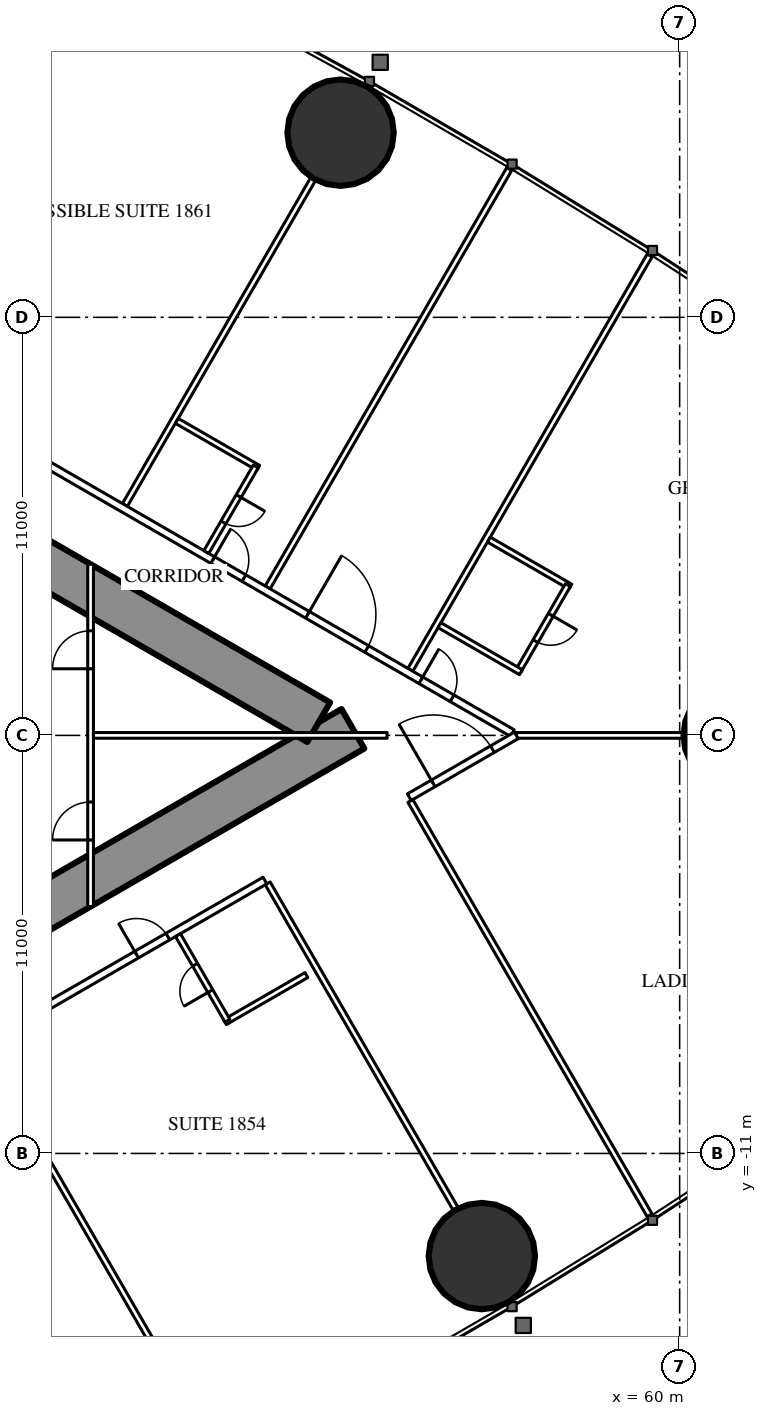
"""IFC4 building model, lengths in metres.
Left out: names, types, materials, properties, quantities, classifications, styles, units other than length and angle.
Written with IfcOpenShell. Run it as: python <this file> out.ifc"""

import sys

from ifc_helpers import new_model, si_unit, direction, frame, frame_2d, origin, origin_2d, place, context, subcontext, project, spatial, rectangle, hollow_circle, extrude, element, fill, save


model = new_model("IFC4")
c1 = context("Model", 3, precision=1e-05, world=origin(), true_north=direction((0.0, 1.0)))
c2 = subcontext(c1, "Body", "Model", "MODEL_VIEW")
j1 = project(units=[si_unit("LENGTHUNIT", "METRE"), si_unit("PLANEANGLEUNIT", "RADIAN")], contexts=[c1])
p1 = place(None, origin())
s1 = spatial("IfcSite", under=j1, at=p1, CompositionType="ELEMENT")
p2 = place(p1, origin())
s2 = spatial("IfcBuilding", under=s1, at=p2, CompositionType="ELEMENT")
p3 = place(p2, frame((0.0, 0.0, 70.5)))
s3 = spatial("IfcBuildingStorey", under=s2, at=p3, CompositionType="ELEMENT", Elevation=70.5)
for number, where, z_axis, x_axis in (
    (1, (51.078, 15.858, 0.0), (0.0, 0.0, 1.0), (1.0, 0.0, 0.0)),
    (2, (54.795, -13.701, 0.0), (0.0, 0.0, 1.0), (1.0, 0.0, 0.0)),
):
    element("IfcColumn", number, at=place(p3, frame(where, z_axis=z_axis, x_axis=x_axis)), inside=s3, PredefinedType="COLUMN", context=c2, shape_type="SweptSolid", body=[
        extrude(hollow_circle(Radius=1.4, WallThickness=0.12, at=origin_2d()), origin(), (0.0, 0.0, 1.0), 3.5),
    ])
p4 = place(p3, frame((61.5, 0.0, 0.0), z_axis=(0.0, 0.0, 1.0), x_axis=(1.0, 0.0, 0.0)))
e3 = element("IfcColumn", 3, at=p4, inside=s3, PredefinedType="COLUMN", context=c2, shape_type="SweptSolid", body=[
    extrude(hollow_circle(Radius=1.4, WallThickness=0.1, at=origin_2d()), origin(), (0.0, 0.0, 1.0), 3.5),
])
p5 = place(p3, frame((27.2, -13.8, 0.0), z_axis=(0.0, 0.0, 1.0), x_axis=(0.866027159892, 0.499996958321, 0.0)))
e4 = element("IfcWall", 4, at=p5, inside=s3, PredefinedType="SHEAR", context=c2, shape_type="SweptSolid", body=[
    extrude(rectangle(XDim=27.947, YDim=1.2, at=frame_2d((13.973, 0.0))), origin(), (0.0, 0.0, 1.0), 3.5),
])
p6 = place(p5, frame((4.6, 0.0, 0.0)))
e5 = element("IfcOpeningElement", 5, at=p6, cuts=e4, PredefinedType="OPENING", context=c2, shape_type="SweptSolid", body=[
    extrude(rectangle(XDim=1.0, YDim=2.2, at=frame_2d((0.5, 1.1))), frame((0.0, 0.61, 0.0), z_axis=(0.0, -1.0, 0.0), x_axis=(1.0, 0.0, 0.0)), (0.0, 0.0, 1.0), 1.22),
])
p7 = place(p5, frame((13.395, 0.0, 0.0)))
e6 = element("IfcOpeningElement", 6, at=p7, cuts=e4, PredefinedType="OPENING", context=c2, shape_type="SweptSolid", body=[
    extrude(rectangle(XDim=1.8, YDim=2.2, at=frame_2d((0.9, 1.1))), frame((0.0, 0.61, 0.0), z_axis=(0.0, -1.0, 0.0), x_axis=(1.0, 0.0, 0.0)), (0.0, 0.0, 1.0), 1.22),
])
p8 = place(p3, frame((27.2, 13.8, 0.0), z_axis=(0.0, 0.0, 1.0), x_axis=(0.866024515034, -0.500001539357, 0.0)))
e7 = element("IfcWall", 7, at=p8, inside=s3, PredefinedType="SHEAR", context=c2, shape_type="SweptSolid", body=[
    extrude(rectangle(XDim=26.907, YDim=1.2, at=frame_2d((13.454, 0.0))), origin(), (0.0, 0.0, 1.0), 3.5),
])
p9 = place(p8, frame((4.6, 0.0, 0.0)))
e8 = element("IfcOpeningElement", 8, at=p9, cuts=e7, PredefinedType="OPENING", context=c2, shape_type="SweptSolid", body=[
    extrude(rectangle(XDim=1.0, YDim=2.2, at=frame_2d((0.5, 1.1))), frame((0.0, 0.61, 0.0), z_axis=(0.0, -1.0, 0.0), x_axis=(1.0, 0.0, 0.0)), (0.0, 0.0, 1.0), 1.22),
])
p10 = place(p8, frame((13.395, 0.0, 0.0)))
e9 = element("IfcOpeningElement", 9, at=p10, cuts=e7, PredefinedType="OPENING", context=c2, shape_type="SweptSolid", body=[
    extrude(rectangle(XDim=1.8, YDim=2.2, at=frame_2d((0.9, 1.1))), frame((0.0, 0.61, 0.0), z_axis=(0.0, -1.0, 0.0), x_axis=(1.0, 0.0, 0.0)), (0.0, 0.0, 1.0), 1.22),
])
p11 = place(p3, frame((41.647, -8.23, 0.0), z_axis=(0.0, 0.0, 1.0), x_axis=(0.49998590462, -0.866033541603, 0.0)))
e10 = element("IfcWall", 10, at=p11, inside=s3, PredefinedType="PARTITIONING", context=c2, shape_type="SweptSolid", body=[
    extrude(rectangle(XDim=12.621, YDim=0.15, at=frame_2d((6.311, 0.0))), origin(), (0.0, 0.0, 1.0), 3.25),
])
p12 = place(p3, frame((49.159, -3.893, 0.0), z_axis=(0.0, 0.0, 1.0), x_axis=(0.499998773722, -0.866026111775, 0.0)))
e11 = element("IfcWall", 11, at=p12, inside=s3, PredefinedType="PARTITIONING", context=c2, shape_type="SweptSolid", body=[
    extrude(rectangle(XDim=9.892, YDim=0.15, at=frame_2d((4.946, 0.0))), origin(), (0.0, 0.0, 1.0), 2.25),
])
p13 = place(p3, frame((52.915, -1.725, 0.0), z_axis=(0.0, 0.0, 1.0), x_axis=(0.499997163113, -0.866027041656, 0.0)))
e12 = element("IfcWall", 12, at=p13, inside=s3, PredefinedType="PARTITIONING", context=c2, shape_type="SweptSolid", body=[
    extrude(rectangle(XDim=12.591, YDim=0.15, at=frame_2d((6.295, 0.0))), origin(), (0.0, 0.0, 1.0), 3.25),
])
p14 = place(p3, frame((45.403, 6.062, 0.0), z_axis=(0.0, 0.0, 1.0), x_axis=(0.500013434677, 0.866017647131, 0.0)))
e13 = element("IfcWall", 13, at=p14, inside=s3, PredefinedType="PARTITIONING", context=c2, shape_type="SweptSolid", body=[
    extrude(rectangle(XDim=9.902, YDim=0.15, at=frame_2d((4.951, 0.0))), origin(), (0.0, 0.0, 1.0), 2.25),
])
p15 = place(p3, frame((49.159, 3.893, 0.0), z_axis=(0.0, 0.0, 1.0), x_axis=(0.499995664361, 0.866027906952, 0.0)))
e14 = element("IfcWall", 14, at=p15, inside=s3, PredefinedType="PARTITIONING", context=c2, shape_type="SweptSolid", body=[
    extrude(rectangle(XDim=12.711, YDim=0.15, at=frame_2d((6.356, 0.0))), origin(), (0.0, 0.0, 1.0), 3.25),
])
p16 = place(p3, frame((52.915, 1.725, 0.0), z_axis=(0.0, 0.0, 1.0), x_axis=(0.499997163113, 0.866027041656, 0.0)))
e15 = element("IfcWall", 15, at=p16, inside=s3, PredefinedType="PARTITIONING", context=c2, shape_type="SweptSolid", body=[
    extrude(rectangle(XDim=12.591, YDim=0.15, at=frame_2d((6.295, 0.0))), origin(), (0.0, 0.0, 1.0), 3.25),
])
p17 = place(p3, frame((55.702, 0.0, 0.0), z_axis=(0.0, 0.0, 1.0), x_axis=(1.0, 0.0, 0.0)))
e16 = element("IfcWall", 16, at=p17, inside=s3, PredefinedType="PARTITIONING", context=c2, shape_type="SweptSolid", body=[
    extrude(rectangle(XDim=16.117, YDim=0.15, at=frame_2d((8.059, 0.0))), origin(), (0.0, 0.0, 1.0), 2.25),
])
p18 = place(p3, frame((36.834, 10.894, 0.0), z_axis=(0.0, 0.0, 1.0), x_axis=(0.866028157229, -0.499995230863, 0.0)))
e17 = element("IfcWall", 17, at=p18, inside=s3, PredefinedType="PARTITIONING", context=c2, shape_type="SweptSolid", body=[
    extrude(rectangle(XDim=21.667, YDim=0.2, at=frame_2d((10.833, 0.0))), origin(), (0.0, 0.0, 1.0), 3.25),
])
p19 = place(p18, frame((18.885, 0.0, 0.0)))
e18 = element("IfcOpeningElement", 18, at=p19, cuts=e17, PredefinedType="OPENING", context=c2, shape_type="SweptSolid", body=[
    extrude(rectangle(XDim=0.95, YDim=2.2, at=frame_2d((0.475, 1.1))), frame((0.0, 0.11, 0.0), z_axis=(0.0, -1.0, 0.0), x_axis=(1.0, 0.0, 0.0)), (0.0, 0.0, 1.0), 0.22),
])
p20 = place(p18, frame((15.443, 0.0, 0.0)))
e19 = element("IfcOpeningElement", 19, at=p20, cuts=e17, PredefinedType="OPENING", context=c2, shape_type="SweptSolid", body=[
    extrude(rectangle(XDim=1.8, YDim=2.2, at=frame_2d((0.9, 1.1))), frame((0.0, 0.11, 0.0), z_axis=(0.0, -1.0, 0.0), x_axis=(1.0, 0.0, 0.0)), (0.0, 0.0, 1.0), 0.22),
])
p21 = place(p18, frame((12.562, 0.0, 0.0)))
e20 = element("IfcOpeningElement", 20, at=p21, cuts=e17, PredefinedType="OPENING", context=c2, shape_type="SweptSolid", body=[
    extrude(rectangle(XDim=0.95, YDim=2.2, at=frame_2d((0.475, 1.1))), frame((0.0, 0.11, 0.0), z_axis=(0.0, -1.0, 0.0), x_axis=(1.0, 0.0, 0.0)), (0.0, 0.0, 1.0), 0.22),
])
p22 = place(p18, frame((4.292, 0.0, 0.0)))
e21 = element("IfcOpeningElement", 21, at=p22, cuts=e17, PredefinedType="OPENING", context=c2, shape_type="SweptSolid", body=[
    extrude(rectangle(XDim=1.0, YDim=2.2, at=frame_2d((0.5, 1.1))), frame((0.0, 0.11, 0.0), z_axis=(0.0, -1.0, 0.0), x_axis=(1.0, 0.0, 0.0)), (0.0, 0.0, 1.0), 0.22),
])
p23 = place(p3, frame((37.96, -10.243, 0.0), z_axis=(0.0, 0.0, 1.0), x_axis=(0.866030548046, 0.499991089772, 0.0)))
e22 = element("IfcWall", 22, at=p23, inside=s3, PredefinedType="PARTITIONING", context=c2, shape_type="SweptSolid", body=[
    extrude(rectangle(XDim=12.849, YDim=0.2, at=frame_2d((6.425, 0.0))), origin(), (0.0, 0.0, 1.0), 3.25),
])
p24 = place(p23, frame((8.949, 0.0, 0.0)))
e23 = element("IfcOpeningElement", 23, at=p24, cuts=e22, PredefinedType="OPENING", context=c2, shape_type="SweptSolid", body=[
    extrude(rectangle(XDim=0.95, YDim=2.2, at=frame_2d((0.475, 1.1))), frame((0.0, 0.11, 0.0), z_axis=(0.0, -1.0, 0.0), x_axis=(1.0, 0.0, 0.0)), (0.0, 0.0, 1.0), 0.22),
])
p25 = place(p23, frame((0.6, 0.0, 0.0)))
e24 = element("IfcOpeningElement", 24, at=p25, cuts=e22, PredefinedType="OPENING", context=c2, shape_type="SweptSolid", body=[
    extrude(rectangle(XDim=0.95, YDim=2.2, at=frame_2d((0.475, 1.1))), frame((0.0, 0.11, 0.0), z_axis=(0.0, -1.0, 0.0), x_axis=(1.0, 0.0, 0.0)), (0.0, 0.0, 1.0), 0.22),
])
p26 = place(p3, frame((52.886, -1.626, 0.0), z_axis=(0.0, 0.0, 1.0), x_axis=(0.866030540913, 0.499991102127, 0.0)))
e25 = element("IfcWall", 25, at=p26, inside=s3, PredefinedType="PARTITIONING", context=c2, shape_type="SweptSolid", body=[
    extrude(rectangle(XDim=3.251, YDim=0.2, at=frame_2d((1.626, 0.0))), origin(), (0.0, 0.0, 1.0), 3.25),
])
p27 = place(p26, frame((0.726, 0.0, 0.0)))
e26 = element("IfcOpeningElement", 26, at=p27, cuts=e25, PredefinedType="OPENING", context=c2, shape_type="SweptSolid", body=[
    extrude(rectangle(XDim=1.8, YDim=2.2, at=frame_2d((0.9, 1.1))), frame((0.0, 0.11, 0.0), z_axis=(0.0, -1.0, 0.0), x_axis=(1.0, 0.0, 0.0)), (0.0, 0.0, 1.0), 0.22),
])
p28 = place(p3, frame((48.035, -7.545, 0.0), z_axis=(0.0, 0.0, 1.0), x_axis=(0.866006523861, 0.500032699561, 0.0)))
e27 = element("IfcWall", 27, at=p28, inside=s3, PredefinedType="PARTITIONING", context=c2, shape_type="SweptSolid", body=[
    extrude(rectangle(XDim=2.475, YDim=0.15, at=frame_2d((1.237, 0.0))), origin(), (0.0, 0.0, 1.0), 3.25),
])
p29 = place(p3, frame((46.8, -5.255, 0.0), z_axis=(0.0, 0.0, 1.0), x_axis=(0.500006934395, -0.866021400173, 0.0)))
e28 = element("IfcWall", 28, at=p29, inside=s3, PredefinedType="PARTITIONING", context=c2, shape_type="SweptSolid", body=[
    extrude(rectangle(XDim=2.6, YDim=0.15, at=frame_2d((1.3, 0.0))), origin(), (0.0, 0.0, 1.0), 3.25),
])
p30 = place(p29, frame((0.9, 0.0, 0.0)))
e29 = element("IfcOpeningElement", 29, at=p30, cuts=e28, PredefinedType="OPENING", context=c2, shape_type="SweptSolid", body=[
    extrude(rectangle(XDim=0.8, YDim=2.2, at=frame_2d((0.4, 1.1))), frame((0.0, 0.085, 0.0), z_axis=(0.0, -1.0, 0.0), x_axis=(1.0, 0.0, 0.0)), (0.0, 0.0, 1.0), 0.17),
])
p31 = place(p3, frame((54.98, 5.151, 0.0), z_axis=(0.0, 0.0, 1.0), x_axis=(0.86604923931, -0.499958713387, 0.0)))
e30 = element("IfcWall", 30, at=p31, inside=s3, PredefinedType="PARTITIONING", context=c2, shape_type="SweptSolid", body=[
    extrude(rectangle(XDim=2.475, YDim=0.15, at=frame_2d((1.237, 0.0))), origin(), (0.0, 0.0, 1.0), 3.25),
])
p32 = place(p3, frame((55.758, 1.7, 0.0), z_axis=(0.0, 0.0, 1.0), x_axis=(0.500006934395, 0.866021400173, 0.0)))
e31 = element("IfcWall", 31, at=p32, inside=s3, PredefinedType="PARTITIONING", context=c2, shape_type="SweptSolid", body=[
    extrude(rectangle(XDim=2.6, YDim=0.15, at=frame_2d((1.3, 0.0))), origin(), (0.0, 0.0, 1.0), 3.25),
])
p33 = place(p32, frame((0.9, 0.0, 0.0)))
e32 = element("IfcOpeningElement", 32, at=p33, cuts=e31, PredefinedType="OPENING", context=c2, shape_type="SweptSolid", body=[
    extrude(rectangle(XDim=0.8, YDim=2.2, at=frame_2d((0.4, 1.1))), frame((0.0, 0.085, 0.0), z_axis=(0.0, -1.0, 0.0), x_axis=(1.0, 0.0, 0.0)), (0.0, 0.0, 1.0), 0.17),
])
p34 = place(p3, frame((53.68, 2.9, 0.0), z_axis=(0.0, 0.0, 1.0), x_axis=(0.866006523861, -0.500032699561, 0.0)))
e33 = element("IfcWall", 33, at=p34, inside=s3, PredefinedType="PARTITIONING", context=c2, shape_type="SweptSolid", body=[
    extrude(rectangle(XDim=2.475, YDim=0.15, at=frame_2d((1.237, 0.0))), origin(), (0.0, 0.0, 1.0), 3.25),
])
p35 = place(p3, frame((46.768, 8.276, 0.0), z_axis=(0.0, 0.0, 1.0), x_axis=(0.866031185235, -0.4999899861, 0.0)))
e34 = element("IfcWall", 34, at=p35, inside=s3, PredefinedType="PARTITIONING", context=c2, shape_type="SweptSolid", body=[
    extrude(rectangle(XDim=2.475, YDim=0.15, at=frame_2d((1.238, 0.0))), origin(), (0.0, 0.0, 1.0), 3.25),
])
p36 = place(p3, frame((47.546, 4.824, 0.0), z_axis=(0.0, 0.0, 1.0), x_axis=(0.500006934395, 0.866021400173, 0.0)))
e35 = element("IfcWall", 35, at=p36, inside=s3, PredefinedType="PARTITIONING", context=c2, shape_type="SweptSolid", body=[
    extrude(rectangle(XDim=2.6, YDim=0.15, at=frame_2d((1.3, 0.0))), origin(), (0.0, 0.0, 1.0), 3.25),
])
p37 = place(p36, frame((0.9, 0.0, 0.0)))
e36 = element("IfcOpeningElement", 36, at=p37, cuts=e35, PredefinedType="OPENING", context=c2, shape_type="SweptSolid", body=[
    extrude(rectangle(XDim=0.8, YDim=2.2, at=frame_2d((0.4, 1.1))), frame((0.0, 0.085, 0.0), z_axis=(0.0, -1.0, 0.0), x_axis=(1.0, 0.0, 0.0)), (0.0, 0.0, 1.0), 0.17),
])
p38 = place(p3, frame((44.5, -4.505, 0.0), z_axis=(0.0, 0.0, 1.0), x_axis=(0.0, 1.0, 0.0)))
e37 = element("IfcWall", 37, at=p38, inside=s3, PredefinedType="PARTITIONING", context=c2, shape_type="SweptSolid", body=[
    extrude(rectangle(XDim=9.009, YDim=0.15, at=frame_2d((4.505, 0.0))), origin(), (0.0, 0.0, 1.0), 2.45),
])
p39 = place(p38, frame((1.752, 0.0, 0.0)))
e38 = element("IfcOpeningElement", 38, at=p39, cuts=e37, PredefinedType="OPENING", context=c2, shape_type="SweptSolid", body=[
    extrude(rectangle(XDim=1.0, YDim=2.2, at=frame_2d((0.5, 1.1))), frame((0.0, 0.085, 0.0), z_axis=(0.0, -1.0, 0.0), x_axis=(1.0, 0.0, 0.0)), (0.0, 0.0, 1.0), 0.17),
])
p40 = place(p38, frame((6.257, 0.0, 0.0)))
e39 = element("IfcOpeningElement", 39, at=p40, cuts=e37, PredefinedType="OPENING", context=c2, shape_type="SweptSolid", body=[
    extrude(rectangle(XDim=1.0, YDim=2.2, at=frame_2d((0.5, 1.1))), frame((0.0, 0.085, 0.0), z_axis=(0.0, -1.0, 0.0), x_axis=(1.0, 0.0, 0.0)), (0.0, 0.0, 1.0), 0.17),
])
p41 = place(p3, frame((44.575, 0.0, 0.0), z_axis=(0.0, 0.0, 1.0), x_axis=(1.0, 0.0, 0.0)))
e40 = element("IfcWall", 40, at=p41, inside=s3, PredefinedType="PARTITIONING", context=c2, shape_type="SweptSolid", body=[
    extrude(rectangle(XDim=7.727, YDim=0.15, at=frame_2d((3.864, 0.0))), origin(), (0.0, 0.0, 1.0), 2.25),
])
p42 = place(p30, origin())
e41 = element("IfcDoor", 41, at=p42, inside=s3, OperationType="SINGLE_SWING_RIGHT", PredefinedType="DOOR", context=c2, shape_type="SweptSolid", body=[
    extrude(rectangle(XDim=0.8, YDim=2.2, at=frame_2d((0.4, 1.1))), frame((0.0, 0.025, 0.0), z_axis=(0.0, -1.0, 0.0), x_axis=(1.0, 0.0, 0.0)), (0.0, 0.0, 1.0), 0.05),
])
fill(e29, e41)
p43 = place(p24, origin())
e42 = element("IfcDoor", 42, at=p43, inside=s3, OperationType="SINGLE_SWING_LEFT", PredefinedType="DOOR", context=c2, shape_type="SweptSolid", body=[
    extrude(rectangle(XDim=0.95, YDim=2.2, at=frame_2d((0.475, 1.1))), frame((0.0, 0.025, 0.0), z_axis=(0.0, -1.0, 0.0), x_axis=(1.0, 0.0, 0.0)), (0.0, 0.0, 1.0), 0.05),
])
fill(e23, e42)
p44 = place(p27, origin())
e43 = element("IfcDoor", 43, at=p44, inside=s3, OperationType="DOUBLE_DOOR_SINGLE_SWING", PredefinedType="DOOR", context=c2, shape_type="SweptSolid", body=[
    extrude(rectangle(XDim=1.8, YDim=2.2, at=frame_2d((0.9, 1.1))), frame((0.0, 0.025, 0.0), z_axis=(0.0, -1.0, 0.0), x_axis=(1.0, 0.0, 0.0)), (0.0, 0.0, 1.0), 0.05),
])
fill(e26, e43)
p45 = place(p33, origin())
e44 = element("IfcDoor", 44, at=p45, inside=s3, OperationType="SINGLE_SWING_RIGHT", PredefinedType="DOOR", context=c2, shape_type="SweptSolid", body=[
    extrude(rectangle(XDim=0.8, YDim=2.2, at=frame_2d((0.4, 1.1))), frame((0.0, 0.025, 0.0), z_axis=(0.0, -1.0, 0.0), x_axis=(1.0, 0.0, 0.0)), (0.0, 0.0, 1.0), 0.05),
])
fill(e32, e44)
p46 = place(p19, origin())
e45 = element("IfcDoor", 45, at=p46, inside=s3, OperationType="SINGLE_SWING_LEFT", PredefinedType="DOOR", context=c2, shape_type="SweptSolid", body=[
    extrude(rectangle(XDim=0.95, YDim=2.2, at=frame_2d((0.475, 1.1))), frame((0.0, 0.025, 0.0), z_axis=(0.0, -1.0, 0.0), x_axis=(1.0, 0.0, 0.0)), (0.0, 0.0, 1.0), 0.05),
])
fill(e18, e45)
p47 = place(p20, origin())
e46 = element("IfcDoor", 46, at=p47, inside=s3, OperationType="DOUBLE_DOOR_SINGLE_SWING", PredefinedType="DOOR", context=c2, shape_type="SweptSolid", body=[
    extrude(rectangle(XDim=1.8, YDim=2.2, at=frame_2d((0.9, 1.1))), frame((0.0, 0.025, 0.0), z_axis=(0.0, -1.0, 0.0), x_axis=(1.0, 0.0, 0.0)), (0.0, 0.0, 1.0), 0.05),
])
fill(e19, e46)
p48 = place(p37, origin())
e47 = element("IfcDoor", 47, at=p48, inside=s3, OperationType="SINGLE_SWING_RIGHT", PredefinedType="DOOR", context=c2, shape_type="SweptSolid", body=[
    extrude(rectangle(XDim=0.8, YDim=2.2, at=frame_2d((0.4, 1.1))), frame((0.0, 0.025, 0.0), z_axis=(0.0, -1.0, 0.0), x_axis=(1.0, 0.0, 0.0)), (0.0, 0.0, 1.0), 0.05),
])
fill(e36, e47)
p49 = place(p21, origin())
e48 = element("IfcDoor", 48, at=p49, inside=s3, OperationType="SINGLE_SWING_LEFT", PredefinedType="DOOR", context=c2, shape_type="SweptSolid", body=[
    extrude(rectangle(XDim=0.95, YDim=2.2, at=frame_2d((0.475, 1.1))), frame((0.0, 0.025, 0.0), z_axis=(0.0, -1.0, 0.0), x_axis=(1.0, 0.0, 0.0)), (0.0, 0.0, 1.0), 0.05),
])
fill(e20, e48)
p50 = place(p39, origin())
e49 = element("IfcDoor", 49, at=p50, inside=s3, OperationType="SINGLE_SWING_LEFT", PredefinedType="DOOR", context=c2, shape_type="SweptSolid", body=[
    extrude(rectangle(XDim=1.0, YDim=2.2, at=frame_2d((0.5, 1.1))), frame((0.0, 0.025, 0.0), z_axis=(0.0, -1.0, 0.0), x_axis=(1.0, 0.0, 0.0)), (0.0, 0.0, 1.0), 0.05),
])
fill(e38, e49)
p51 = place(p40, origin())
e50 = element("IfcDoor", 50, at=p51, inside=s3, OperationType="SINGLE_SWING_LEFT", PredefinedType="DOOR", context=c2, shape_type="SweptSolid", body=[
    extrude(rectangle(XDim=1.0, YDim=2.2, at=frame_2d((0.5, 1.1))), frame((0.0, 0.025, 0.0), z_axis=(0.0, -1.0, 0.0), x_axis=(1.0, 0.0, 0.0)), (0.0, 0.0, 1.0), 0.05),
])
fill(e39, e50)
save(model, sys.argv[1])
